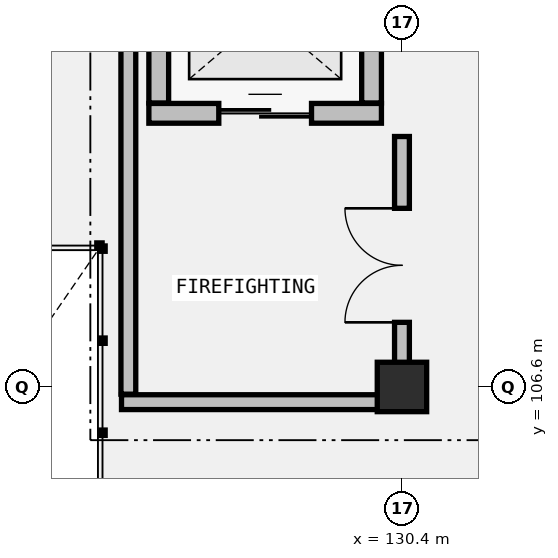
"""IFC4 building model, lengths in metres.
Left out: names, types, materials, properties, quantities, classifications, styles, units other than length and angle.
Written with IfcOpenShell. Run it as: python <this file> out.ifc"""

import sys

from ifc_helpers import new_model, si_unit, direction, frame, frame_2d, origin, origin_2d, place, context, subcontext, project, spatial, rectangle, extrude, element, fill, save


model = new_model("IFC4")
c1 = context("Model", 3, precision=1e-05, world=origin(), true_north=direction((0.0, 1.0)))
c2 = subcontext(c1, "Body", "Model", "MODEL_VIEW")
j1 = project(units=[si_unit("LENGTHUNIT", "METRE"), si_unit("PLANEANGLEUNIT", "RADIAN")], contexts=[c1])
p1 = place(None, origin())
s1 = spatial("IfcSite", under=j1, at=p1, CompositionType="ELEMENT")
p2 = place(p1, origin())
s2 = spatial("IfcBuilding", under=s1, at=p2, CompositionType="ELEMENT")
p3 = place(p2, frame((0.0, 0.0, 5.4)))
s3 = spatial("IfcBuildingStorey", under=s2, at=p3, CompositionType="ELEMENT", Elevation=5.4)
p4 = place(p3, frame((130.4, 106.6, 0.0), z_axis=(0.0, 0.0, 1.0), x_axis=(1.0, 0.0, 0.0)))
e1 = element("IfcColumn", 1, at=p4, inside=s3, PredefinedType="COLUMN", context=c2, shape_type="SweptSolid", body=[
    extrude(rectangle(XDim=0.65, YDim=0.65, at=origin_2d()), origin(), (0.0, 0.0, 1.0), 4.6),
])
p5 = place(p3, frame((127.07, 110.2, 0.0), z_axis=(0.0, 0.0, 1.0), x_axis=(1.0, 0.0, 0.0)))
e2 = element("IfcWall", 2, at=p5, inside=s3, PredefinedType="STANDARD", context=c2, shape_type="SweptSolid", body=[
    extrude(rectangle(XDim=3.06, YDim=0.26, at=frame_2d((1.53, 0.0))), origin(), (0.0, 0.0, 1.0), 4.36),
])
p6 = place(p5, frame((0.92, 0.0, 0.0)))
e3 = element("IfcOpeningElement", 3, at=p6, cuts=e2, PredefinedType="OPENING", context=c2, shape_type="SweptSolid", body=[
    extrude(rectangle(XDim=1.22, YDim=2.2, at=frame_2d((0.61, 1.1))), frame((0.0, 0.14, 0.0), z_axis=(0.0, -1.0, 0.0), x_axis=(1.0, 0.0, 0.0)), (0.0, 0.0, 1.0), 0.28),
])
for number, where, z_axis, x_axis in (
    (4, (127.2, 110.336, 0.0), (0.0, 0.0, 1.0), (0.0, 1.0, 0.0)),
    (5, (130.0, 110.336, 0.0), (0.0, 0.0, 1.0), (0.0, 1.0, 0.0)),
):
    element("IfcWall", number, at=place(p3, frame(where, z_axis=z_axis, x_axis=x_axis)), inside=s3, PredefinedType="STANDARD", context=c2, shape_type="SweptSolid", body=[
        extrude(rectangle(XDim=2.328, YDim=0.26, at=frame_2d((1.164, 0.0))), origin(), (0.0, 0.0, 1.0), 4.36),
    ])
p7 = place(p3, frame((126.8, 106.505, 0.0), z_axis=(0.0, 0.0, 1.0), x_axis=(0.0, 1.0, 0.0)))
e6 = element("IfcWall", 6, at=p7, inside=s3, PredefinedType="PARTITIONING", context=c2, shape_type="SweptSolid", body=[
    extrude(rectangle(XDim=7.275, YDim=0.195, at=frame_2d((3.638, 0.0))), origin(), (0.0, 0.0, 1.0), 3.898),
])
p8 = place(p3, frame((126.71, 106.4, 0.0), z_axis=(0.0, 0.0, 1.0), x_axis=(1.0, 0.0, 0.0)))
e7 = element("IfcWall", 7, at=p8, inside=s3, PredefinedType="PARTITIONING", context=c2, shape_type="SweptSolid", body=[
    extrude(rectangle(XDim=3.78, YDim=0.195, at=frame_2d((1.89, 0.0))), origin(), (0.0, 0.0, 1.0), 3.898),
])
p9 = place(p3, frame((130.4, 106.505, 0.0), z_axis=(0.0, 0.0, 1.0), x_axis=(0.0, 1.0, 0.0)))
e8 = element("IfcWall", 8, at=p9, inside=s3, PredefinedType="PARTITIONING", context=c2, shape_type="SweptSolid", body=[
    extrude(rectangle(XDim=3.39, YDim=0.195, at=frame_2d((1.695, 0.0))), origin(), (0.0, 0.0, 1.0), 4.044),
])
p10 = place(p9, frame((0.945, 0.0, 0.0)))
e9 = element("IfcOpeningElement", 9, at=p10, cuts=e8, PredefinedType="OPENING", context=c2, shape_type="SweptSolid", body=[
    extrude(rectangle(XDim=1.5, YDim=2.2, at=frame_2d((0.75, 1.1))), frame((0.0, 0.107, 0.0), z_axis=(0.0, -1.0, 0.0), x_axis=(1.0, 0.0, 0.0)), (0.0, 0.0, 1.0), 0.215),
])
p11 = place(p6, origin())
e10 = element("IfcDoor", 10, at=p11, inside=s3, OperationType="SLIDING_TO_RIGHT", PredefinedType="DOOR", context=c2, shape_type="SweptSolid", body=[
    extrude(rectangle(XDim=1.22, YDim=2.2, at=frame_2d((0.61, 1.1))), frame((0.0, 0.025, 0.0), z_axis=(0.0, -1.0, 0.0), x_axis=(1.0, 0.0, 0.0)), (0.0, 0.0, 1.0), 0.05),
])
fill(e3, e10)
p12 = place(p10, origin())
e11 = element("IfcDoor", 11, at=p12, inside=s3, OperationType="DOUBLE_DOOR_SINGLE_SWING", PredefinedType="DOOR", context=c2, shape_type="SweptSolid", body=[
    extrude(rectangle(XDim=1.5, YDim=2.2, at=frame_2d((0.75, 1.1))), frame((0.0, 0.025, 0.0), z_axis=(0.0, -1.0, 0.0), x_axis=(1.0, 0.0, 0.0)), (0.0, 0.0, 1.0), 0.05),
])
fill(e9, e11)
save(model, sys.argv[1])
